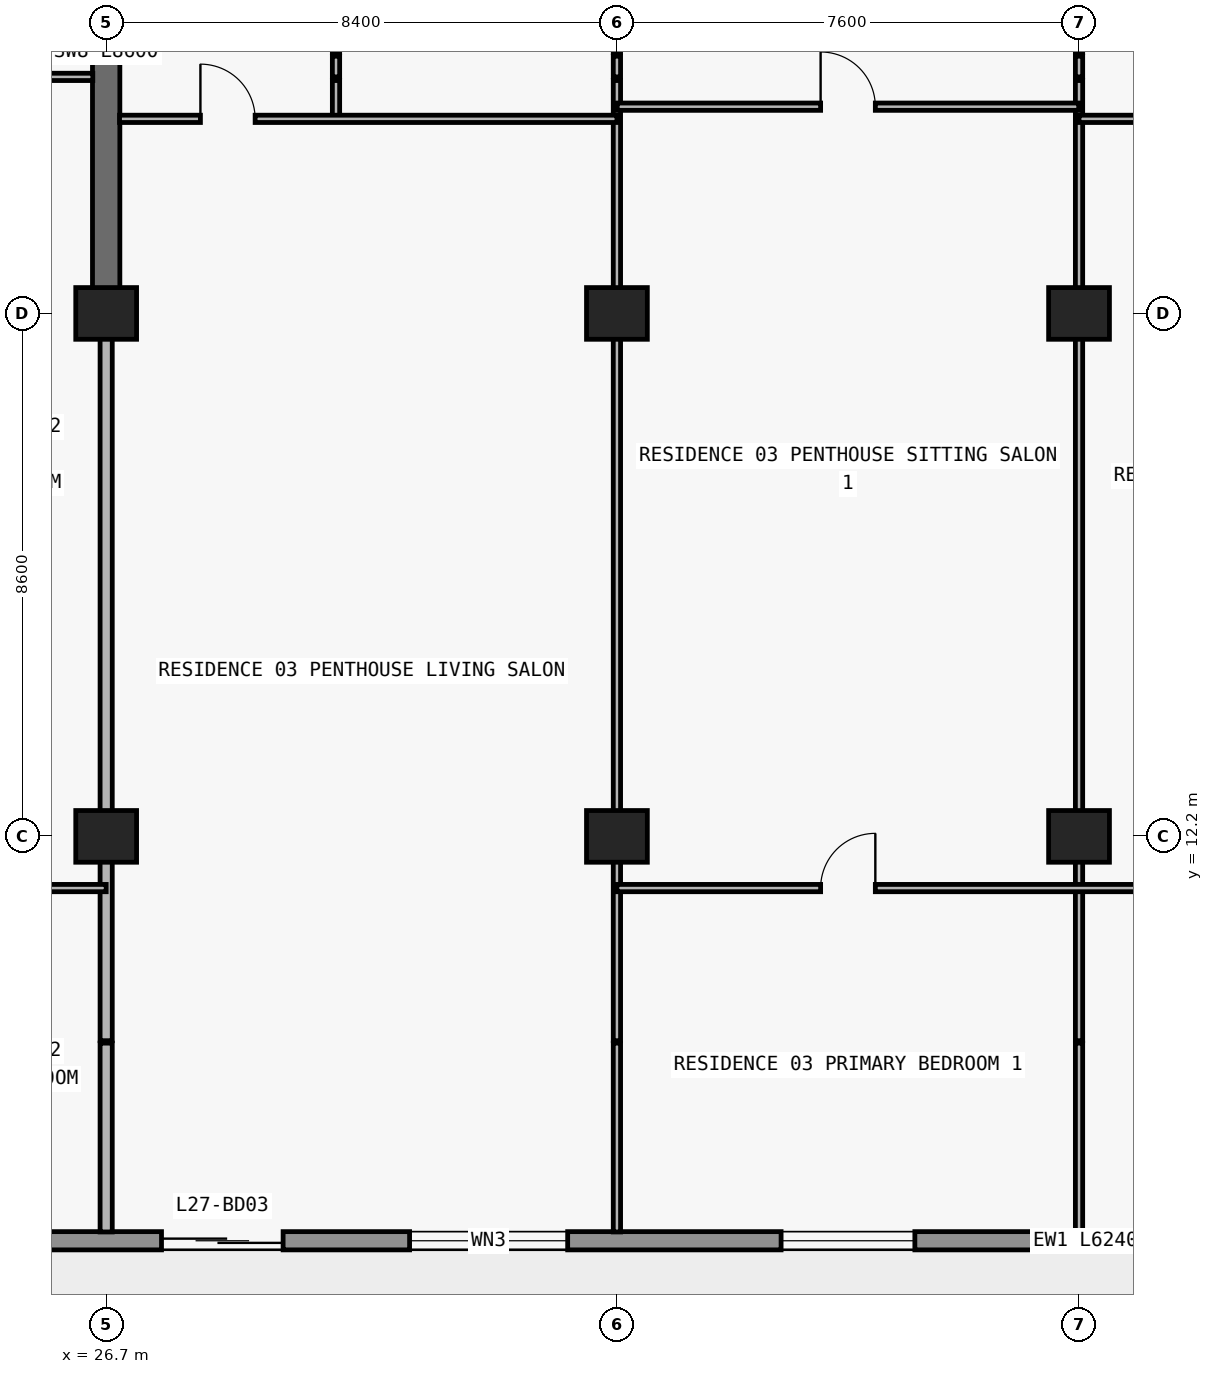
"""IFC4 building model, lengths in metres.
Left out: names, types, materials, properties, quantities, classifications, styles, units other than length and angle.
Written with IfcOpenShell. Run it as: python <this file> out.ifc"""

import sys

from ifc_helpers import new_model, si_unit, direction, frame, frame_2d, origin, origin_2d, place, context, subcontext, project, spatial, rectangle, extrude, element, fill, save


model = new_model("IFC4")
c1 = context("Model", 3, precision=1e-05, world=origin(), true_north=direction((0.0, 1.0)))
c2 = subcontext(c1, "Body", "Model", "MODEL_VIEW")
j1 = project(units=[si_unit("LENGTHUNIT", "METRE"), si_unit("PLANEANGLEUNIT", "RADIAN")], contexts=[c1])
p1 = place(None, origin())
s1 = spatial("IfcSite", under=j1, at=p1, CompositionType="ELEMENT")
p2 = place(p1, origin())
s2 = spatial("IfcBuilding", under=s1, at=p2, CompositionType="ELEMENT")
p3 = place(p2, frame((0.0, 0.0, 102.6)))
s3 = spatial("IfcBuildingStorey", under=s2, at=p3, CompositionType="ELEMENT", Elevation=102.6)
for number, where, z_axis, x_axis in (
    (1, (26.7, 12.2, 0.0), (0.0, 0.0, 1.0), (1.0, 0.0, 0.0)),
    (2, (35.1, 12.2, 0.0), (0.0, 0.0, 1.0), (1.0, 0.0, 0.0)),
    (3, (42.7, 12.2, 0.0), (0.0, 0.0, 1.0), (1.0, 0.0, 0.0)),
    (4, (26.7, 20.8, 0.0), (0.0, 0.0, 1.0), (1.0, 0.0, 0.0)),
    (5, (35.1, 20.8, 0.0), (0.0, 0.0, 1.0), (1.0, 0.0, 0.0)),
    (6, (42.7, 20.8, 0.0), (0.0, 0.0, 1.0), (1.0, 0.0, 0.0)),
):
    element("IfcColumn", number, at=place(p3, frame(where, z_axis=z_axis, x_axis=x_axis)), inside=s3, PredefinedType="COLUMN", context=c2, shape_type="SweptSolid", body=[
        extrude(rectangle(XDim=1.0, YDim=0.85, at=origin_2d()), origin(), (0.0, 0.0, 1.0), 3.05),
    ])
p4 = place(p3, frame((26.7, 20.8, 0.0), z_axis=(0.0, 0.0, 1.0), x_axis=(0.0, 1.0, 0.0)))
e7 = element("IfcWall", 7, at=p4, inside=s3, PredefinedType="SHEAR", context=c2, shape_type="SweptSolid", body=[
    extrude(rectangle(XDim=8.6, YDim=0.45, at=frame_2d((4.3, 0.0))), origin(), (0.0, 0.0, 1.0), 3.05),
])
p5 = place(p3, frame((70.1, 5.55, 0.0), z_axis=(0.0, 0.0, 1.0), x_axis=(-1.0, 0.0, 0.0)))
e8 = element("IfcWall", 8, at=p5, inside=s3, PredefinedType="STANDARD", context=c2, shape_type="SweptSolid", body=[
    extrude(rectangle(XDim=62.4, YDim=0.3, at=frame_2d((31.2, 0.0))), origin(), (0.0, 0.0, 1.0), 3.05),
])
p6 = place(p5, frame((57.226, 0.0, 0.0)))
e9 = element("IfcOpeningElement", 9, at=p6, cuts=e8, PredefinedType="OPENING", context=c2, shape_type="SweptSolid", body=[
    extrude(rectangle(XDim=2.0, YDim=2.3, at=frame_2d((1.0, 1.15))), frame((0.0, 0.16, 0.0), z_axis=(0.0, -1.0, 0.0), x_axis=(1.0, 0.0, 0.0)), (0.0, 0.0, 1.0), 0.32),
])
p7 = place(p5, frame((52.926, 0.0, 0.85)))
e10 = element("IfcOpeningElement", 10, at=p7, cuts=e8, PredefinedType="OPENING", context=c2, shape_type="SweptSolid", body=[
    extrude(rectangle(XDim=2.2, YDim=1.55, at=frame_2d((1.1, 0.775))), frame((0.0, 0.16, 0.0), z_axis=(0.0, -1.0, 0.0), x_axis=(1.0, 0.0, 0.0)), (0.0, 0.0, 1.0), 0.32),
])
p8 = place(p5, frame((48.49, 0.0, 0.0)))
e11 = element("IfcOpeningElement", 11, at=p8, cuts=e8, PredefinedType="OPENING", context=c2, shape_type="SweptSolid", body=[
    extrude(rectangle(XDim=2.0, YDim=2.3, at=frame_2d((1.0, 1.15))), frame((0.0, 0.16, 0.0), z_axis=(0.0, -1.0, 0.0), x_axis=(1.0, 0.0, 0.0)), (0.0, 0.0, 1.0), 0.32),
])
p9 = place(p5, frame((44.39, 0.0, 0.85)))
e12 = element("IfcOpeningElement", 12, at=p9, cuts=e8, PredefinedType="OPENING", context=c2, shape_type="SweptSolid", body=[
    extrude(rectangle(XDim=1.8, YDim=1.55, at=frame_2d((0.9, 0.775))), frame((0.0, 0.16, 0.0), z_axis=(0.0, -1.0, 0.0), x_axis=(1.0, 0.0, 0.0)), (0.0, 0.0, 1.0), 0.32),
])
p10 = place(p5, frame((40.49, 0.0, 0.0)))
e13 = element("IfcOpeningElement", 13, at=p10, cuts=e8, PredefinedType="OPENING", context=c2, shape_type="SweptSolid", body=[
    extrude(rectangle(XDim=2.0, YDim=2.3, at=frame_2d((1.0, 1.15))), frame((0.0, 0.16, 0.0), z_axis=(0.0, -1.0, 0.0), x_axis=(1.0, 0.0, 0.0)), (0.0, 0.0, 1.0), 0.32),
])
p11 = place(p5, frame((35.81, 0.0, 0.65)))
e14 = element("IfcOpeningElement", 14, at=p11, cuts=e8, PredefinedType="OPENING", context=c2, shape_type="SweptSolid", body=[
    extrude(rectangle(XDim=2.6, YDim=1.85, at=frame_2d((1.3, 0.925))), frame((0.0, 0.16, 0.0), z_axis=(0.0, -1.0, 0.0), x_axis=(1.0, 0.0, 0.0)), (0.0, 0.0, 1.0), 0.32),
])
p12 = place(p5, frame((30.1, 0.0, 0.85)))
e15 = element("IfcOpeningElement", 15, at=p12, cuts=e8, PredefinedType="OPENING", context=c2, shape_type="SweptSolid", body=[
    extrude(rectangle(XDim=2.2, YDim=1.55, at=frame_2d((1.1, 0.775))), frame((0.0, 0.16, 0.0), z_axis=(0.0, -1.0, 0.0), x_axis=(1.0, 0.0, 0.0)), (0.0, 0.0, 1.0), 0.32),
])
p13 = place(p5, frame((22.1, 0.0, 0.85)))
e16 = element("IfcOpeningElement", 16, at=p13, cuts=e8, PredefinedType="OPENING", context=c2, shape_type="SweptSolid", body=[
    extrude(rectangle(XDim=2.2, YDim=1.55, at=frame_2d((1.1, 0.775))), frame((0.0, 0.16, 0.0), z_axis=(0.0, -1.0, 0.0), x_axis=(1.0, 0.0, 0.0)), (0.0, 0.0, 1.0), 0.32),
])
p14 = place(p5, frame((15.69, 0.0, 0.0)))
e17 = element("IfcOpeningElement", 17, at=p14, cuts=e8, PredefinedType="OPENING", context=c2, shape_type="SweptSolid", body=[
    extrude(rectangle(XDim=2.0, YDim=2.3, at=frame_2d((1.0, 1.15))), frame((0.0, 0.16, 0.0), z_axis=(0.0, -1.0, 0.0), x_axis=(1.0, 0.0, 0.0)), (0.0, 0.0, 1.0), 0.32),
])
p15 = place(p5, frame((11.59, 0.0, 0.85)))
e18 = element("IfcOpeningElement", 18, at=p15, cuts=e8, PredefinedType="OPENING", context=c2, shape_type="SweptSolid", body=[
    extrude(rectangle(XDim=1.8, YDim=1.55, at=frame_2d((0.9, 0.775))), frame((0.0, 0.16, 0.0), z_axis=(0.0, -1.0, 0.0), x_axis=(1.0, 0.0, 0.0)), (0.0, 0.0, 1.0), 0.32),
])
p16 = place(p5, frame((7.626, 0.0, 0.0)))
e19 = element("IfcOpeningElement", 19, at=p16, cuts=e8, PredefinedType="OPENING", context=c2, shape_type="SweptSolid", body=[
    extrude(rectangle(XDim=2.0, YDim=2.3, at=frame_2d((1.0, 1.15))), frame((0.0, 0.16, 0.0), z_axis=(0.0, -1.0, 0.0), x_axis=(1.0, 0.0, 0.0)), (0.0, 0.0, 1.0), 0.32),
])
p17 = place(p5, frame((3.326, 0.0, 0.85)))
e20 = element("IfcOpeningElement", 20, at=p17, cuts=e8, PredefinedType="OPENING", context=c2, shape_type="SweptSolid", body=[
    extrude(rectangle(XDim=2.2, YDim=1.55, at=frame_2d((1.1, 0.775))), frame((0.0, 0.16, 0.0), z_axis=(0.0, -1.0, 0.0), x_axis=(1.0, 0.0, 0.0)), (0.0, 0.0, 1.0), 0.32),
])
p18 = place(p3, frame((26.7, 5.695, 0.0), z_axis=(0.0, 0.0, 1.0), x_axis=(0.0, 1.0, 0.0)))
e21 = element("IfcWall", 21, at=p18, inside=s3, PredefinedType="PARTITIONING", context=c2, shape_type="SweptSolid", body=[
    extrude(rectangle(XDim=3.105, YDim=0.2, at=frame_2d((1.552, 0.0))), origin(), (0.0, 0.0, 1.0), 3.05),
])
p19 = place(p3, frame((26.7, 8.84, 0.0), z_axis=(0.0, 0.0, 1.0), x_axis=(0.0, 1.0, 0.0)))
e22 = element("IfcWall", 22, at=p19, inside=s3, PredefinedType="PARTITIONING", context=c2, shape_type="SweptSolid", body=[
    extrude(rectangle(XDim=11.955, YDim=0.2, at=frame_2d((5.978, 0.0))), origin(), (0.0, 0.0, 1.0), 2.174),
])
p20 = place(p3, frame((30.48, 24.0, 0.0), z_axis=(0.0, 0.0, 1.0), x_axis=(0.0, 1.0, 0.0)))
e23 = element("IfcWall", 23, at=p20, inside=s3, PredefinedType="PARTITIONING", context=c2, shape_type="SweptSolid", body=[
    extrude(rectangle(XDim=0.63, YDim=0.12, at=frame_2d((0.315, 0.0))), origin(), (0.0, 0.0, 1.0), 3.05),
])
p21 = place(p3, frame((30.48, 24.69, 0.0), z_axis=(0.0, 0.0, 1.0), x_axis=(0.0, 1.0, 0.0)))
e24 = element("IfcWall", 24, at=p21, inside=s3, PredefinedType="PARTITIONING", context=c2, shape_type="SweptSolid", body=[
    extrude(rectangle(XDim=0.34, YDim=0.12, at=frame_2d((0.17, 0.0))), origin(), (0.0, 0.0, 1.0), 3.05),
])
p22 = place(p3, frame((35.1, 5.695, 0.0), z_axis=(0.0, 0.0, 1.0), x_axis=(0.0, 1.0, 0.0)))
e25 = element("IfcWall", 25, at=p22, inside=s3, PredefinedType="PARTITIONING", context=c2, shape_type="SweptSolid", body=[
    extrude(rectangle(XDim=3.105, YDim=0.12, at=frame_2d((1.552, 0.0))), origin(), (0.0, 0.0, 1.0), 3.05),
])
p23 = place(p3, frame((35.1, 8.84, 0.0), z_axis=(0.0, 0.0, 1.0), x_axis=(0.0, 1.0, 0.0)))
e26 = element("IfcWall", 26, at=p23, inside=s3, PredefinedType="PARTITIONING", context=c2, shape_type="SweptSolid", body=[
    extrude(rectangle(XDim=15.79, YDim=0.12, at=frame_2d((7.895, 0.0))), origin(), (0.0, 0.0, 1.0), 2.174),
])
p24 = place(p3, frame((35.1, 24.69, 0.0), z_axis=(0.0, 0.0, 1.0), x_axis=(0.0, 1.0, 0.0)))
e27 = element("IfcWall", 27, at=p24, inside=s3, PredefinedType="PARTITIONING", context=c2, shape_type="SweptSolid", body=[
    extrude(rectangle(XDim=0.34, YDim=0.12, at=frame_2d((0.17, 0.0))), origin(), (0.0, 0.0, 1.0), 2.174),
])
p25 = place(p3, frame((42.7, 5.695, 0.0), z_axis=(0.0, 0.0, 1.0), x_axis=(0.0, 1.0, 0.0)))
e28 = element("IfcWall", 28, at=p25, inside=s3, PredefinedType="PARTITIONING", context=c2, shape_type="SweptSolid", body=[
    extrude(rectangle(XDim=3.105, YDim=0.12, at=frame_2d((1.552, 0.0))), origin(), (0.0, 0.0, 1.0), 3.05),
])
p26 = place(p3, frame((42.7, 8.84, 0.0), z_axis=(0.0, 0.0, 1.0), x_axis=(0.0, 1.0, 0.0)))
e29 = element("IfcWall", 29, at=p26, inside=s3, PredefinedType="PARTITIONING", context=c2, shape_type="SweptSolid", body=[
    extrude(rectangle(XDim=15.79, YDim=0.12, at=frame_2d((7.895, 0.0))), origin(), (0.0, 0.0, 1.0), 2.174),
])
p27 = place(p3, frame((42.7, 24.69, 0.0), z_axis=(0.0, 0.0, 1.0), x_axis=(0.0, 1.0, 0.0)))
e30 = element("IfcWall", 30, at=p27, inside=s3, PredefinedType="PARTITIONING", context=c2, shape_type="SweptSolid", body=[
    extrude(rectangle(XDim=0.34, YDim=0.12, at=frame_2d((0.17, 0.0))), origin(), (0.0, 0.0, 1.0), 2.174),
])
p28 = place(p3, frame((22.92, 11.35, 0.0), z_axis=(0.0, 0.0, 1.0), x_axis=(1.0, 0.0, 0.0)))
e31 = element("IfcWall", 31, at=p28, inside=s3, PredefinedType="PARTITIONING", context=c2, shape_type="SweptSolid", body=[
    extrude(rectangle(XDim=3.78, YDim=0.12, at=frame_2d((1.89, 0.0))), origin(), (0.0, 0.0, 1.0), 3.05),
])
p29 = place(p28, frame((1.44, 0.0, 0.0)))
e32 = element("IfcOpeningElement", 32, at=p29, cuts=e31, PredefinedType="OPENING", context=c2, shape_type="SweptSolid", body=[
    extrude(rectangle(XDim=0.9, YDim=2.15, at=frame_2d((0.45, 1.075))), frame((0.0, 0.07, 0.0), z_axis=(0.0, -1.0, 0.0), x_axis=(1.0, 0.0, 0.0)), (0.0, 0.0, 1.0), 0.14),
])
p30 = place(p3, frame((35.1, 11.35, 0.0), z_axis=(0.0, 0.0, 1.0), x_axis=(1.0, 0.0, 0.0)))
e33 = element("IfcWall", 33, at=p30, inside=s3, PredefinedType="PARTITIONING", context=c2, shape_type="SweptSolid", body=[
    extrude(rectangle(XDim=16.0, YDim=0.12, at=frame_2d((8.0, 0.0))), origin(), (0.0, 0.0, 1.0), 3.05),
])
p31 = place(p30, frame((3.35, 0.0, 0.0)))
e34 = element("IfcOpeningElement", 34, at=p31, cuts=e33, PredefinedType="OPENING", context=c2, shape_type="SweptSolid", body=[
    extrude(rectangle(XDim=0.9, YDim=2.15, at=frame_2d((0.45, 1.075))), frame((0.0, 0.07, 0.0), z_axis=(0.0, -1.0, 0.0), x_axis=(1.0, 0.0, 0.0)), (0.0, 0.0, 1.0), 0.14),
])
p32 = place(p30, frame((11.35, 0.0, 0.0)))
e35 = element("IfcOpeningElement", 35, at=p32, cuts=e33, PredefinedType="OPENING", context=c2, shape_type="SweptSolid", body=[
    extrude(rectangle(XDim=0.9, YDim=2.15, at=frame_2d((0.45, 1.075))), frame((0.0, 0.07, 0.0), z_axis=(0.0, -1.0, 0.0), x_axis=(1.0, 0.0, 0.0)), (0.0, 0.0, 1.0), 0.14),
])
p33 = place(p3, frame((26.92, 24.0, 0.0), z_axis=(0.0, 0.0, 1.0), x_axis=(1.0, 0.0, 0.0)))
e36 = element("IfcWall", 36, at=p33, inside=s3, PredefinedType="PARTITIONING", context=c2, shape_type="SweptSolid", body=[
    extrude(rectangle(XDim=8.18, YDim=0.12, at=frame_2d((4.09, 0.0))), origin(), (0.0, 0.0, 1.0), 3.05),
])
p34 = place(p33, frame((1.33, 0.0, 0.0)))
e37 = element("IfcOpeningElement", 37, at=p34, cuts=e36, PredefinedType="OPENING", context=c2, shape_type="SweptSolid", body=[
    extrude(rectangle(XDim=0.9, YDim=2.15, at=frame_2d((0.45, 1.075))), frame((0.0, 0.07, 0.0), z_axis=(0.0, -1.0, 0.0), x_axis=(1.0, 0.0, 0.0)), (0.0, 0.0, 1.0), 0.14),
])
p35 = place(p3, frame((42.7, 24.0, 0.0), z_axis=(0.0, 0.0, 1.0), x_axis=(1.0, 0.0, 0.0)))
e38 = element("IfcWall", 38, at=p35, inside=s3, PredefinedType="PARTITIONING", context=c2, shape_type="SweptSolid", body=[
    extrude(rectangle(XDim=8.18, YDim=0.12, at=frame_2d((4.09, 0.0))), origin(), (0.0, 0.0, 1.0), 3.05),
])
p36 = place(p35, frame((3.64, 0.0, 0.0)))
e39 = element("IfcOpeningElement", 39, at=p36, cuts=e38, PredefinedType="OPENING", context=c2, shape_type="SweptSolid", body=[
    extrude(rectangle(XDim=0.9, YDim=2.15, at=frame_2d((0.45, 1.075))), frame((0.0, 0.07, 0.0), z_axis=(0.0, -1.0, 0.0), x_axis=(1.0, 0.0, 0.0)), (0.0, 0.0, 1.0), 0.14),
])
p37 = place(p3, frame((35.105, 24.2, 0.0), z_axis=(0.0, 0.0, 1.0), x_axis=(1.0, 0.0, 0.0)))
e40 = element("IfcWall", 40, at=p37, inside=s3, PredefinedType="PARTITIONING", context=c2, shape_type="SweptSolid", body=[
    extrude(rectangle(XDim=7.59, YDim=0.12, at=frame_2d((3.795, 0.0))), origin(), (0.0, 0.0, 1.0), 3.05),
])
p38 = place(p37, frame((3.345, 0.0, 0.0)))
e41 = element("IfcOpeningElement", 41, at=p38, cuts=e40, PredefinedType="OPENING", context=c2, shape_type="SweptSolid", body=[
    extrude(rectangle(XDim=0.9, YDim=2.15, at=frame_2d((0.45, 1.075))), frame((0.0, 0.07, 0.0), z_axis=(0.0, -1.0, 0.0), x_axis=(1.0, 0.0, 0.0)), (0.0, 0.0, 1.0), 0.14),
])
p39 = place(p3, frame((18.3, 24.69, 0.0), z_axis=(0.0, 0.0, 1.0), x_axis=(1.0, 0.0, 0.0)))
e42 = element("IfcWall", 42, at=p39, inside=s3, PredefinedType="PARTITIONING", context=c2, shape_type="SweptSolid", body=[
    extrude(rectangle(XDim=8.18, YDim=0.12, at=frame_2d((4.09, 0.0))), origin(), (0.0, 0.0, 1.0), 3.05),
])
p40 = place(p39, frame((1.818, 0.0, 0.0)))
e43 = element("IfcOpeningElement", 43, at=p40, cuts=e42, PredefinedType="OPENING", context=c2, shape_type="SweptSolid", body=[
    extrude(rectangle(XDim=0.9, YDim=2.15, at=frame_2d((0.45, 1.075))), frame((0.0, 0.07, 0.0), z_axis=(0.0, -1.0, 0.0), x_axis=(1.0, 0.0, 0.0)), (0.0, 0.0, 1.0), 0.14),
])
p41 = place(p39, frame((5.95, 0.0, 0.0)))
e44 = element("IfcOpeningElement", 44, at=p41, cuts=e42, PredefinedType="OPENING", context=c2, shape_type="SweptSolid", body=[
    extrude(rectangle(XDim=0.9, YDim=2.15, at=frame_2d((0.45, 1.075))), frame((0.0, 0.07, 0.0), z_axis=(0.0, -1.0, 0.0), x_axis=(1.0, 0.0, 0.0)), (0.0, 0.0, 1.0), 0.14),
])
p42 = place(p10, origin())
e45 = element("IfcDoor", 45, at=p42, inside=s3, OperationType="DOUBLE_DOOR_SLIDING", PredefinedType="DOOR", context=c2, shape_type="SweptSolid", body=[
    extrude(rectangle(XDim=2.0, YDim=2.3, at=frame_2d((1.0, 1.15))), frame((0.0, 0.025, 0.0), z_axis=(0.0, -1.0, 0.0), x_axis=(1.0, 0.0, 0.0)), (0.0, 0.0, 1.0), 0.05),
])
fill(e13, e45)
p43 = place(p11, origin())
e46 = element("IfcWindow", 46, at=p43, inside=s3, PartitioningType="SINGLE_PANEL", PredefinedType="WINDOW", context=c2, shape_type="SweptSolid", body=[
    extrude(rectangle(XDim=2.6, YDim=1.85, at=frame_2d((1.3, 0.925))), frame((0.0, 0.03, 0.0), z_axis=(0.0, -1.0, 0.0), x_axis=(1.0, 0.0, 0.0)), (0.0, 0.0, 1.0), 0.06),
])
fill(e14, e46)
p44 = place(p12, origin())
e47 = element("IfcWindow", 47, at=p44, inside=s3, PartitioningType="SINGLE_PANEL", PredefinedType="WINDOW", context=c2, shape_type="SweptSolid", body=[
    extrude(rectangle(XDim=2.2, YDim=1.55, at=frame_2d((1.1, 0.775))), frame((0.0, 0.03, 0.0), z_axis=(0.0, -1.0, 0.0), x_axis=(1.0, 0.0, 0.0)), (0.0, 0.0, 1.0), 0.06),
])
fill(e15, e47)
p45 = place(p34, origin())
e48 = element("IfcDoor", 48, at=p45, inside=s3, OperationType="SINGLE_SWING_LEFT", PredefinedType="DOOR", context=c2, shape_type="SweptSolid", body=[
    extrude(rectangle(XDim=0.9, YDim=2.15, at=frame_2d((0.45, 1.075))), frame((0.0, 0.025, 0.0), z_axis=(0.0, -1.0, 0.0), x_axis=(1.0, 0.0, 0.0)), (0.0, 0.0, 1.0), 0.05),
])
fill(e37, e48)
p46 = place(p38, origin())
e49 = element("IfcDoor", 49, at=p46, inside=s3, OperationType="SINGLE_SWING_LEFT", PredefinedType="DOOR", context=c2, shape_type="SweptSolid", body=[
    extrude(rectangle(XDim=0.9, YDim=2.15, at=frame_2d((0.45, 1.075))), frame((0.0, 0.025, 0.0), z_axis=(0.0, -1.0, 0.0), x_axis=(1.0, 0.0, 0.0)), (0.0, 0.0, 1.0), 0.05),
])
fill(e41, e49)
p47 = place(p31, origin())
e50 = element("IfcDoor", 50, at=p47, inside=s3, OperationType="SINGLE_SWING_RIGHT", PredefinedType="DOOR", context=c2, shape_type="SweptSolid", body=[
    extrude(rectangle(XDim=0.9, YDim=2.15, at=frame_2d((0.45, 1.075))), frame((0.0, 0.025, 0.0), z_axis=(0.0, -1.0, 0.0), x_axis=(1.0, 0.0, 0.0)), (0.0, 0.0, 1.0), 0.05),
])
fill(e34, e50)
save(model, sys.argv[1])
